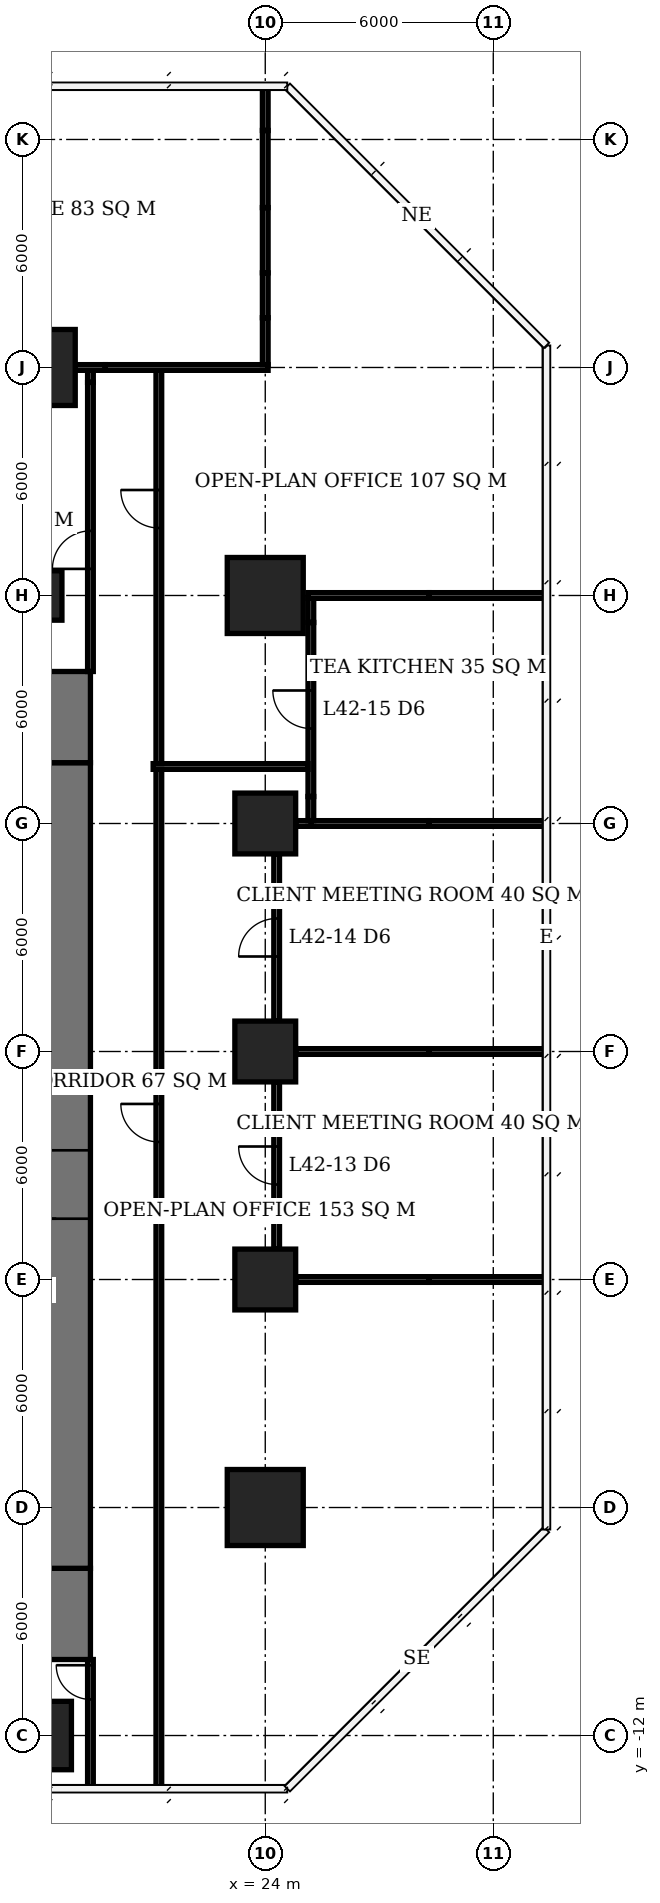
"""IFC4 building model, lengths in metres.
Left out: names, types, materials, properties, quantities, classifications, styles, units other than length and angle.
Written with IfcOpenShell. Run it as: python <this file> out.ifc"""

import sys

from ifc_helpers import new_model, si_unit, direction, frame, frame_2d, origin, origin_2d, place, context, subcontext, project, spatial, rectangle, extrude, element, fill, save


model = new_model("IFC4")
c1 = context("Model", 3, precision=1e-05, world=origin(), true_north=direction((0.0, 1.0)))
c2 = subcontext(c1, "Body", "Model", "MODEL_VIEW")
j1 = project(units=[si_unit("LENGTHUNIT", "METRE"), si_unit("PLANEANGLEUNIT", "RADIAN")], contexts=[c1])
p1 = place(None, origin())
s1 = spatial("IfcSite", under=j1, at=p1, CompositionType="ELEMENT")
p2 = place(p1, origin())
s2 = spatial("IfcBuilding", under=s1, at=p2, CompositionType="ELEMENT")
p3 = place(p2, frame((0.0, 0.0, 173.3)))
s3 = spatial("IfcBuildingStorey", under=s2, at=p3, CompositionType="ELEMENT", Elevation=173.3)
p4 = place(p3, frame((18.0, -12.0, 0.0), z_axis=(0.0, 0.0, 1.0), x_axis=(1.0, 0.0, 0.0)))
e1 = element("IfcColumn", 1, at=p4, inside=s3, PredefinedType="COLUMN", context=c2, shape_type="SweptSolid", body=[
    extrude(rectangle(XDim=1.8, YDim=1.8, at=origin_2d()), origin(), (0.0, 0.0, 1.0), 3.9),
])
p5 = place(p3, frame((18.0, 18.0, 0.0), z_axis=(0.0, 0.0, 1.0), x_axis=(1.0, 0.0, 0.0)))
e2 = element("IfcColumn", 2, at=p5, inside=s3, PredefinedType="COLUMN", context=c2, shape_type="SweptSolid", body=[
    extrude(rectangle(XDim=1.3, YDim=1.3, at=origin_2d()), origin(), (0.0, 0.0, 1.0), 3.9),
])
for number, where, z_axis, x_axis in (
    (3, (18.0, 24.0, 0.0), (0.0, 0.0, 1.0), (1.0, 0.0, 0.0)),
    (4, (24.0, -6.0, 0.0), (0.0, 0.0, 1.0), (1.0, 0.0, 0.0)),
):
    element("IfcColumn", number, at=place(p3, frame(where, z_axis=z_axis, x_axis=x_axis)), inside=s3, PredefinedType="COLUMN", context=c2, shape_type="SweptSolid", body=[
        extrude(rectangle(XDim=2.0, YDim=2.0, at=origin_2d()), origin(), (0.0, 0.0, 1.0), 3.9),
    ])
for number, where, z_axis, x_axis in (
    (5, (24.0, 0.0, 0.0), (0.0, 0.0, 1.0), (1.0, 0.0, 0.0)),
    (6, (24.0, 6.0, 0.0), (0.0, 0.0, 1.0), (1.0, 0.0, 0.0)),
    (7, (24.0, 12.0, 0.0), (0.0, 0.0, 1.0), (1.0, 0.0, 0.0)),
):
    element("IfcColumn", number, at=place(p3, frame(where, z_axis=z_axis, x_axis=x_axis)), inside=s3, PredefinedType="COLUMN", context=c2, shape_type="SweptSolid", body=[
        extrude(rectangle(XDim=1.6, YDim=1.6, at=origin_2d()), origin(), (0.0, 0.0, 1.0), 3.9),
    ])
p6 = place(p3, frame((24.0, 18.0, 0.0), z_axis=(0.0, 0.0, 1.0), x_axis=(1.0, 0.0, 0.0)))
e8 = element("IfcColumn", 8, at=p6, inside=s3, PredefinedType="COLUMN", context=c2, shape_type="SweptSolid", body=[
    extrude(rectangle(XDim=2.0, YDim=2.0, at=origin_2d()), origin(), (0.0, 0.0, 1.0), 3.9),
])
p7 = place(p3, frame((18.5, -7.6, 0.0), z_axis=(0.0, 0.0, 1.0), x_axis=(0.0, 1.0, 0.0)))
e9 = element("IfcWall", 9, at=p7, inside=s3, PredefinedType="SHEAR", context=c2, shape_type="SweptSolid", body=[
    extrude(rectangle(XDim=21.2, YDim=1.8, at=frame_2d((10.6, 0.0))), origin(), (0.0, 0.0, 1.0), 3.9),
])
p8 = place(p7, frame((9.2, 0.0, 0.0)))
e10 = element("IfcOpeningElement", 10, at=p8, cuts=e9, PredefinedType="OPENING", context=c2, shape_type="SweptSolid", body=[
    extrude(rectangle(XDim=1.8, YDim=2.4, at=frame_2d((0.9, 1.2))), frame((0.0, 0.91, 0.0), z_axis=(0.0, -1.0, 0.0), x_axis=(1.0, 0.0, 0.0)), (0.0, 0.0, 1.0), 1.82),
])
for number, where, z_axis, x_axis in (
    (11, (18.5, -10.0, 0.0), (0.0, 0.0, 1.0), (0.0, 1.0, 0.0)),
    (12, (18.5, 13.6, 0.0), (0.0, 0.0, 1.0), (0.0, 1.0, 0.0)),
):
    element("IfcWall", number, at=place(p3, frame(where, z_axis=z_axis, x_axis=x_axis)), inside=s3, PredefinedType="SHEAR", context=c2, shape_type="SweptSolid", body=[
        extrude(rectangle(XDim=2.4, YDim=1.8, at=frame_2d((1.2, 0.0))), origin(), (0.0, 0.0, 1.0), 3.9),
    ])
p9 = place(p3, frame((24.8, 0.0, 0.0), z_axis=(0.0, 0.0, 1.0), x_axis=(1.0, 0.0, 0.0)))
e13 = element("IfcWall", 13, at=p9, inside=s3, PredefinedType="PARTITIONING", context=c2, shape_type="SweptSolid", body=[
    extrude(rectangle(XDim=3.51, YDim=0.15, at=frame_2d((1.755, 0.0))), origin(), (0.0, 0.0, 1.0), 2.65),
])
p10 = place(p3, frame((28.31, 0.0, 0.0), z_axis=(0.0, 0.0, 1.0), x_axis=(1.0, 0.0, 0.0)))
e14 = element("IfcWall", 14, at=p10, inside=s3, PredefinedType="PARTITIONING", context=c2, shape_type="SweptSolid", body=[
    extrude(rectangle(XDim=3.09, YDim=0.15, at=frame_2d((1.545, 0.0))), origin(), (0.0, 0.0, 1.0), 3.65),
])
p11 = place(p3, frame((24.8, 6.0, 0.0), z_axis=(0.0, 0.0, 1.0), x_axis=(1.0, 0.0, 0.0)))
e15 = element("IfcWall", 15, at=p11, inside=s3, PredefinedType="PARTITIONING", context=c2, shape_type="SweptSolid", body=[
    extrude(rectangle(XDim=3.51, YDim=0.15, at=frame_2d((1.755, 0.0))), origin(), (0.0, 0.0, 1.0), 2.65),
])
p12 = place(p3, frame((28.31, 6.0, 0.0), z_axis=(0.0, 0.0, 1.0), x_axis=(1.0, 0.0, 0.0)))
e16 = element("IfcWall", 16, at=p12, inside=s3, PredefinedType="PARTITIONING", context=c2, shape_type="SweptSolid", body=[
    extrude(rectangle(XDim=3.04, YDim=0.15, at=frame_2d((1.52, 0.0))), origin(), (0.0, 0.0, 1.0), 3.65),
])
p13 = place(p3, frame((24.8, 12.0, 0.0), z_axis=(0.0, 0.0, 1.0), x_axis=(1.0, 0.0, 0.0)))
e17 = element("IfcWall", 17, at=p13, inside=s3, PredefinedType="PARTITIONING", context=c2, shape_type="SweptSolid", body=[
    extrude(rectangle(XDim=0.475, YDim=0.15, at=frame_2d((0.237, 0.0))), origin(), (0.0, 0.0, 1.0), 2.65),
])
p14 = place(p3, frame((25.2, 12.0, 0.0), z_axis=(0.0, 0.0, 1.0), x_axis=(1.0, 0.0, 0.0)))
e18 = element("IfcWall", 18, at=p14, inside=s3, PredefinedType="PARTITIONING", context=c2, shape_type="SweptSolid", body=[
    extrude(rectangle(XDim=3.11, YDim=0.15, at=frame_2d((1.555, 0.0))), origin(), (0.0, 0.0, 1.0), 2.65),
])
p15 = place(p3, frame((28.31, 12.0, 0.0), z_axis=(0.0, 0.0, 1.0), x_axis=(1.0, 0.0, 0.0)))
e19 = element("IfcWall", 19, at=p15, inside=s3, PredefinedType="PARTITIONING", context=c2, shape_type="SweptSolid", body=[
    extrude(rectangle(XDim=3.04, YDim=0.15, at=frame_2d((1.52, 0.0))), origin(), (0.0, 0.0, 1.0), 3.65),
])
p16 = place(p3, frame((25.125, 18.0, 0.0), z_axis=(0.0, 0.0, 1.0), x_axis=(1.0, 0.0, 0.0)))
e20 = element("IfcWall", 20, at=p16, inside=s3, PredefinedType="PARTITIONING", context=c2, shape_type="SweptSolid", body=[
    extrude(rectangle(XDim=3.185, YDim=0.15, at=frame_2d((1.593, 0.0))), origin(), (0.0, 0.0, 1.0), 2.65),
])
p17 = place(p3, frame((28.31, 18.0, 0.0), z_axis=(0.0, 0.0, 1.0), x_axis=(1.0, 0.0, 0.0)))
e21 = element("IfcWall", 21, at=p17, inside=s3, PredefinedType="PARTITIONING", context=c2, shape_type="SweptSolid", body=[
    extrude(rectangle(XDim=3.09, YDim=0.15, at=frame_2d((1.545, 0.0))), origin(), (0.0, 0.0, 1.0), 3.65),
])
p18 = place(p3, frame((19.0, 24.0, 0.0), z_axis=(0.0, 0.0, 1.0), x_axis=(1.0, 0.0, 0.0)))
e22 = element("IfcWall", 22, at=p18, inside=s3, PredefinedType="PARTITIONING", context=c2, shape_type="SweptSolid", body=[
    extrude(rectangle(XDim=0.792, YDim=0.15, at=frame_2d((0.396, 0.0))), origin(), (0.0, 0.0, 1.0), 2.65),
])
p19 = place(p3, frame((19.792, 24.0, 0.0), z_axis=(0.0, 0.0, 1.0), x_axis=(1.0, 0.0, 0.0)))
e23 = element("IfcWall", 23, at=p19, inside=s3, PredefinedType="PARTITIONING", context=c2, shape_type="SweptSolid", body=[
    extrude(rectangle(XDim=4.283, YDim=0.15, at=frame_2d((2.142, 0.0))), origin(), (0.0, 0.0, 1.0), 3.65),
])
p20 = place(p3, frame((24.0, 24.075, 0.0), z_axis=(0.0, 0.0, 1.0), x_axis=(0.0, 1.0, 0.0)))
e24 = element("IfcWall", 24, at=p20, inside=s3, PredefinedType="PARTITIONING", context=c2, shape_type="SweptSolid", body=[
    extrude(rectangle(XDim=1.235, YDim=0.15, at=frame_2d((0.618, 0.0))), origin(), (0.0, 0.0, 1.0), 3.65),
])
p21 = place(p3, frame((24.0, 25.31, 0.0), z_axis=(0.0, 0.0, 1.0), x_axis=(0.0, 1.0, 0.0)))
e25 = element("IfcWall", 25, at=p21, inside=s3, PredefinedType="PARTITIONING", context=c2, shape_type="SweptSolid", body=[
    extrude(rectangle(XDim=1.18, YDim=0.15, at=frame_2d((0.59, 0.0))), origin(), (0.0, 0.0, 1.0), 2.65),
])
p22 = place(p3, frame((24.0, 26.49, 0.0), z_axis=(0.0, 0.0, 1.0), x_axis=(0.0, 1.0, 0.0)))
e26 = element("IfcWall", 26, at=p22, inside=s3, PredefinedType="PARTITIONING", context=c2, shape_type="SweptSolid", body=[
    extrude(rectangle(XDim=1.718, YDim=0.15, at=frame_2d((0.859, 0.0))), origin(), (0.0, 0.0, 1.0), 3.65),
])
p23 = place(p3, frame((24.0, 28.208, 0.0), z_axis=(0.0, 0.0, 1.0), x_axis=(0.0, 1.0, 0.0)))
e27 = element("IfcWall", 27, at=p23, inside=s3, PredefinedType="PARTITIONING", context=c2, shape_type="SweptSolid", body=[
    extrude(rectangle(XDim=2.029, YDim=0.15, at=frame_2d((1.015, 0.0))), origin(), (0.0, 0.0, 1.0), 2.65),
])
p24 = place(p3, frame((24.0, 30.237, 0.0), z_axis=(0.0, 0.0, 1.0), x_axis=(0.0, 1.0, 0.0)))
e28 = element("IfcWall", 28, at=p24, inside=s3, PredefinedType="PARTITIONING", context=c2, shape_type="SweptSolid", body=[
    extrude(rectangle(XDim=1.163, YDim=0.15, at=frame_2d((0.582, 0.0))), origin(), (0.0, 0.0, 1.0), 3.65),
])
p25 = place(p3, frame((24.3, 0.8, 0.0), z_axis=(0.0, 0.0, 1.0), x_axis=(0.0, 1.0, 0.0)))
e29 = element("IfcWall", 29, at=p25, inside=s3, PredefinedType="PARTITIONING", context=c2, shape_type="SweptSolid", body=[
    extrude(rectangle(XDim=4.4, YDim=0.15, at=frame_2d((2.2, 0.0))), origin(), (0.0, 0.0, 1.0), 3.65),
])
p26 = place(p25, frame((1.7, 0.0, 0.0)))
e30 = element("IfcOpeningElement", 30, at=p26, cuts=e29, PredefinedType="OPENING", context=c2, shape_type="SweptSolid", body=[
    extrude(rectangle(XDim=1.0, YDim=2.1, at=frame_2d((0.5, 1.05))), frame((0.0, 0.085, 0.0), z_axis=(0.0, -1.0, 0.0), x_axis=(1.0, 0.0, 0.0)), (0.0, 0.0, 1.0), 0.17),
])
p27 = place(p3, frame((24.3, 6.8, 0.0), z_axis=(0.0, 0.0, 1.0), x_axis=(0.0, 1.0, 0.0)))
e31 = element("IfcWall", 31, at=p27, inside=s3, PredefinedType="PARTITIONING", context=c2, shape_type="SweptSolid", body=[
    extrude(rectangle(XDim=4.4, YDim=0.15, at=frame_2d((2.2, 0.0))), origin(), (0.0, 0.0, 1.0), 3.65),
])
p28 = place(p27, frame((1.7, 0.0, 0.0)))
e32 = element("IfcOpeningElement", 32, at=p28, cuts=e31, PredefinedType="OPENING", context=c2, shape_type="SweptSolid", body=[
    extrude(rectangle(XDim=1.0, YDim=2.1, at=frame_2d((0.5, 1.05))), frame((0.0, 0.085, 0.0), z_axis=(0.0, -1.0, 0.0), x_axis=(1.0, 0.0, 0.0)), (0.0, 0.0, 1.0), 0.17),
])
p29 = place(p3, frame((25.2, 12.075, 0.0), z_axis=(0.0, 0.0, 1.0), x_axis=(0.0, 1.0, 0.0)))
e33 = element("IfcWall", 33, at=p29, inside=s3, PredefinedType="PARTITIONING", context=c2, shape_type="SweptSolid", body=[
    extrude(rectangle(XDim=0.635, YDim=0.15, at=frame_2d((0.317, 0.0))), origin(), (0.0, 0.0, 1.0), 2.65),
])
p30 = place(p3, frame((25.2, 12.71, 0.0), z_axis=(0.0, 0.0, 1.0), x_axis=(0.0, 1.0, 0.0)))
e34 = element("IfcWall", 34, at=p30, inside=s3, PredefinedType="PARTITIONING", context=c2, shape_type="SweptSolid", body=[
    extrude(rectangle(XDim=4.58, YDim=0.15, at=frame_2d((2.29, 0.0))), origin(), (0.0, 0.0, 1.0), 3.65),
])
p31 = place(p30, frame((1.79, 0.0, 0.0)))
e35 = element("IfcOpeningElement", 35, at=p31, cuts=e34, PredefinedType="OPENING", context=c2, shape_type="SweptSolid", body=[
    extrude(rectangle(XDim=1.0, YDim=2.1, at=frame_2d((0.5, 1.05))), frame((0.0, 0.085, 0.0), z_axis=(0.0, -1.0, 0.0), x_axis=(1.0, 0.0, 0.0)), (0.0, 0.0, 1.0), 0.17),
])
p32 = place(p3, frame((25.2, 17.29, 0.0), z_axis=(0.0, 0.0, 1.0), x_axis=(0.0, 1.0, 0.0)))
e36 = element("IfcWall", 36, at=p32, inside=s3, PredefinedType="PARTITIONING", context=c2, shape_type="SweptSolid", body=[
    extrude(rectangle(XDim=0.635, YDim=0.15, at=frame_2d((0.317, 0.0))), origin(), (0.0, 0.0, 1.0), 2.65),
])
p33 = place(p3, frame((19.4, -13.4, 0.0), z_axis=(0.0, 0.0, 1.0), x_axis=(0.0, 1.0, 0.0)))
e37 = element("IfcWall", 37, at=p33, inside=s3, PredefinedType="PARTITIONING", context=c2, shape_type="SweptSolid", body=[
    extrude(rectangle(XDim=3.4, YDim=0.15, at=frame_2d((1.7, 0.0))), origin(), (0.0, 0.0, 1.0), 3.65),
])
p34 = place(p33, frame((2.35, 0.0, 0.0)))
e38 = element("IfcOpeningElement", 38, at=p34, cuts=e37, PredefinedType="OPENING", context=c2, shape_type="SweptSolid", body=[
    extrude(rectangle(XDim=0.9, YDim=2.1, at=frame_2d((0.45, 1.05))), frame((0.0, 0.085, 0.0), z_axis=(0.0, -1.0, 0.0), x_axis=(1.0, 0.0, 0.0)), (0.0, 0.0, 1.0), 0.17),
])
p35 = place(p3, frame((19.4, 16.0, 0.0), z_axis=(0.0, 0.0, 1.0), x_axis=(0.0, 1.0, 0.0)))
e39 = element("IfcWall", 39, at=p35, inside=s3, PredefinedType="PARTITIONING", context=c2, shape_type="SweptSolid", body=[
    extrude(rectangle(XDim=7.608, YDim=0.15, at=frame_2d((3.804, 0.0))), origin(), (0.0, 0.0, 1.0), 3.65),
])
p36 = place(p35, frame((2.7, 0.0, 0.0)))
e40 = element("IfcOpeningElement", 40, at=p36, cuts=e39, PredefinedType="OPENING", context=c2, shape_type="SweptSolid", body=[
    extrude(rectangle(XDim=1.0, YDim=2.1, at=frame_2d((0.5, 1.05))), frame((0.0, 0.085, 0.0), z_axis=(0.0, -1.0, 0.0), x_axis=(1.0, 0.0, 0.0)), (0.0, 0.0, 1.0), 0.17),
])
p37 = place(p3, frame((19.4, 23.608, 0.0), z_axis=(0.0, 0.0, 1.0), x_axis=(0.0, 1.0, 0.0)))
e41 = element("IfcWall", 41, at=p37, inside=s3, PredefinedType="PARTITIONING", context=c2, shape_type="SweptSolid", body=[
    extrude(rectangle(XDim=0.317, YDim=0.15, at=frame_2d((0.159, 0.0))), origin(), (0.0, 0.0, 1.0), 2.65),
])
p38 = place(p3, frame((21.2, -13.4, 0.0), z_axis=(0.0, 0.0, 1.0), x_axis=(0.0, 1.0, 0.0)))
e42 = element("IfcWall", 42, at=p38, inside=s3, PredefinedType="PARTITIONING", context=c2, shape_type="SweptSolid", body=[
    extrude(rectangle(XDim=26.825, YDim=0.15, at=frame_2d((13.413, 0.0))), origin(), (0.0, 0.0, 1.0), 3.65),
])
p39 = place(p38, frame((17.02, 0.0, 0.0)))
e43 = element("IfcOpeningElement", 43, at=p39, cuts=e42, PredefinedType="OPENING", context=c2, shape_type="SweptSolid", body=[
    extrude(rectangle(XDim=1.0, YDim=2.1, at=frame_2d((0.5, 1.05))), frame((0.0, 0.085, 0.0), z_axis=(0.0, -1.0, 0.0), x_axis=(1.0, 0.0, 0.0)), (0.0, 0.0, 1.0), 0.17),
])
p40 = place(p3, frame((21.2, 13.575, 0.0), z_axis=(0.0, 0.0, 1.0), x_axis=(0.0, 1.0, 0.0)))
e44 = element("IfcWall", 44, at=p40, inside=s3, PredefinedType="PARTITIONING", context=c2, shape_type="SweptSolid", body=[
    extrude(rectangle(XDim=10.35, YDim=0.15, at=frame_2d((5.175, 0.0))), origin(), (0.0, 0.0, 1.0), 3.65),
])
p41 = place(p40, frame((6.201, 0.0, 0.0)))
e45 = element("IfcOpeningElement", 45, at=p41, cuts=e44, PredefinedType="OPENING", context=c2, shape_type="SweptSolid", body=[
    extrude(rectangle(XDim=1.0, YDim=2.1, at=frame_2d((0.5, 1.05))), frame((0.0, 0.085, 0.0), z_axis=(0.0, -1.0, 0.0), x_axis=(1.0, 0.0, 0.0)), (0.0, 0.0, 1.0), 0.17),
])
p42 = place(p3, frame((21.05, 13.5, 0.0), z_axis=(0.0, 0.0, 1.0), x_axis=(1.0, 0.0, 0.0)))
e46 = element("IfcWall", 46, at=p42, inside=s3, PredefinedType="PARTITIONING", context=c2, shape_type="SweptSolid", body=[
    extrude(rectangle(XDim=4.075, YDim=0.15, at=frame_2d((2.038, 0.0))), origin(), (0.0, 0.0, 1.0), 3.65),
])
p43 = place(p8, origin())
e47 = element("IfcDoor", 47, at=p43, inside=s3, OperationType="DOUBLE_DOOR_SINGLE_SWING", PredefinedType="DOOR", context=c2, shape_type="SweptSolid", body=[
    extrude(rectangle(XDim=1.8, YDim=2.4, at=frame_2d((0.9, 1.2))), frame((0.0, 0.025, 0.0), z_axis=(0.0, -1.0, 0.0), x_axis=(1.0, 0.0, 0.0)), (0.0, 0.0, 1.0), 0.05),
])
fill(e10, e47)
p44 = place(p26, origin())
e48 = element("IfcDoor", 48, at=p44, inside=s3, OperationType="SINGLE_SWING_RIGHT", PredefinedType="DOOR", context=c2, shape_type="SweptSolid", body=[
    extrude(rectangle(XDim=1.0, YDim=2.1, at=frame_2d((0.5, 1.05))), frame((0.0, 0.025, 0.0), z_axis=(0.0, -1.0, 0.0), x_axis=(1.0, 0.0, 0.0)), (0.0, 0.0, 1.0), 0.05),
])
fill(e30, e48)
p45 = place(p28, origin())
e49 = element("IfcDoor", 49, at=p45, inside=s3, OperationType="SINGLE_SWING_LEFT", PredefinedType="DOOR", context=c2, shape_type="SweptSolid", body=[
    extrude(rectangle(XDim=1.0, YDim=2.1, at=frame_2d((0.5, 1.05))), frame((0.0, 0.025, 0.0), z_axis=(0.0, -1.0, 0.0), x_axis=(1.0, 0.0, 0.0)), (0.0, 0.0, 1.0), 0.05),
])
fill(e32, e49)
p46 = place(p31, origin())
e50 = element("IfcDoor", 50, at=p46, inside=s3, OperationType="SINGLE_SWING_RIGHT", PredefinedType="DOOR", context=c2, shape_type="SweptSolid", body=[
    extrude(rectangle(XDim=1.0, YDim=2.1, at=frame_2d((0.5, 1.05))), frame((0.0, 0.025, 0.0), z_axis=(0.0, -1.0, 0.0), x_axis=(1.0, 0.0, 0.0)), (0.0, 0.0, 1.0), 0.05),
])
fill(e35, e50)
p47 = place(p39, origin())
e51 = element("IfcDoor", 51, at=p47, inside=s3, OperationType="SINGLE_SWING_RIGHT", PredefinedType="DOOR", context=c2, shape_type="SweptSolid", body=[
    extrude(rectangle(XDim=1.0, YDim=2.1, at=frame_2d((0.5, 1.05))), frame((0.0, 0.025, 0.0), z_axis=(0.0, -1.0, 0.0), x_axis=(1.0, 0.0, 0.0)), (0.0, 0.0, 1.0), 0.05),
])
fill(e43, e51)
p48 = place(p41, origin())
e52 = element("IfcDoor", 52, at=p48, inside=s3, OperationType="SINGLE_SWING_RIGHT", PredefinedType="DOOR", context=c2, shape_type="SweptSolid", body=[
    extrude(rectangle(XDim=1.0, YDim=2.1, at=frame_2d((0.5, 1.05))), frame((0.0, 0.025, 0.0), z_axis=(0.0, -1.0, 0.0), x_axis=(1.0, 0.0, 0.0)), (0.0, 0.0, 1.0), 0.05),
])
fill(e45, e52)
p49 = place(p36, origin())
e53 = element("IfcDoor", 53, at=p49, inside=s3, OperationType="SINGLE_SWING_LEFT", PredefinedType="DOOR", context=c2, shape_type="SweptSolid", body=[
    extrude(rectangle(XDim=1.0, YDim=2.1, at=frame_2d((0.5, 1.05))), frame((0.0, 0.025, 0.0), z_axis=(0.0, -1.0, 0.0), x_axis=(1.0, 0.0, 0.0)), (0.0, 0.0, 1.0), 0.05),
])
fill(e40, e53)
p50 = place(p34, origin())
e54 = element("IfcDoor", 54, at=p50, inside=s3, OperationType="SINGLE_SWING_RIGHT", PredefinedType="DOOR", context=c2, shape_type="SweptSolid", body=[
    extrude(rectangle(XDim=0.9, YDim=2.1, at=frame_2d((0.45, 1.05))), frame((0.0, 0.025, 0.0), z_axis=(0.0, -1.0, 0.0), x_axis=(1.0, 0.0, 0.0)), (0.0, 0.0, 1.0), 0.05),
])
fill(e38, e54)
save(model, sys.argv[1])
